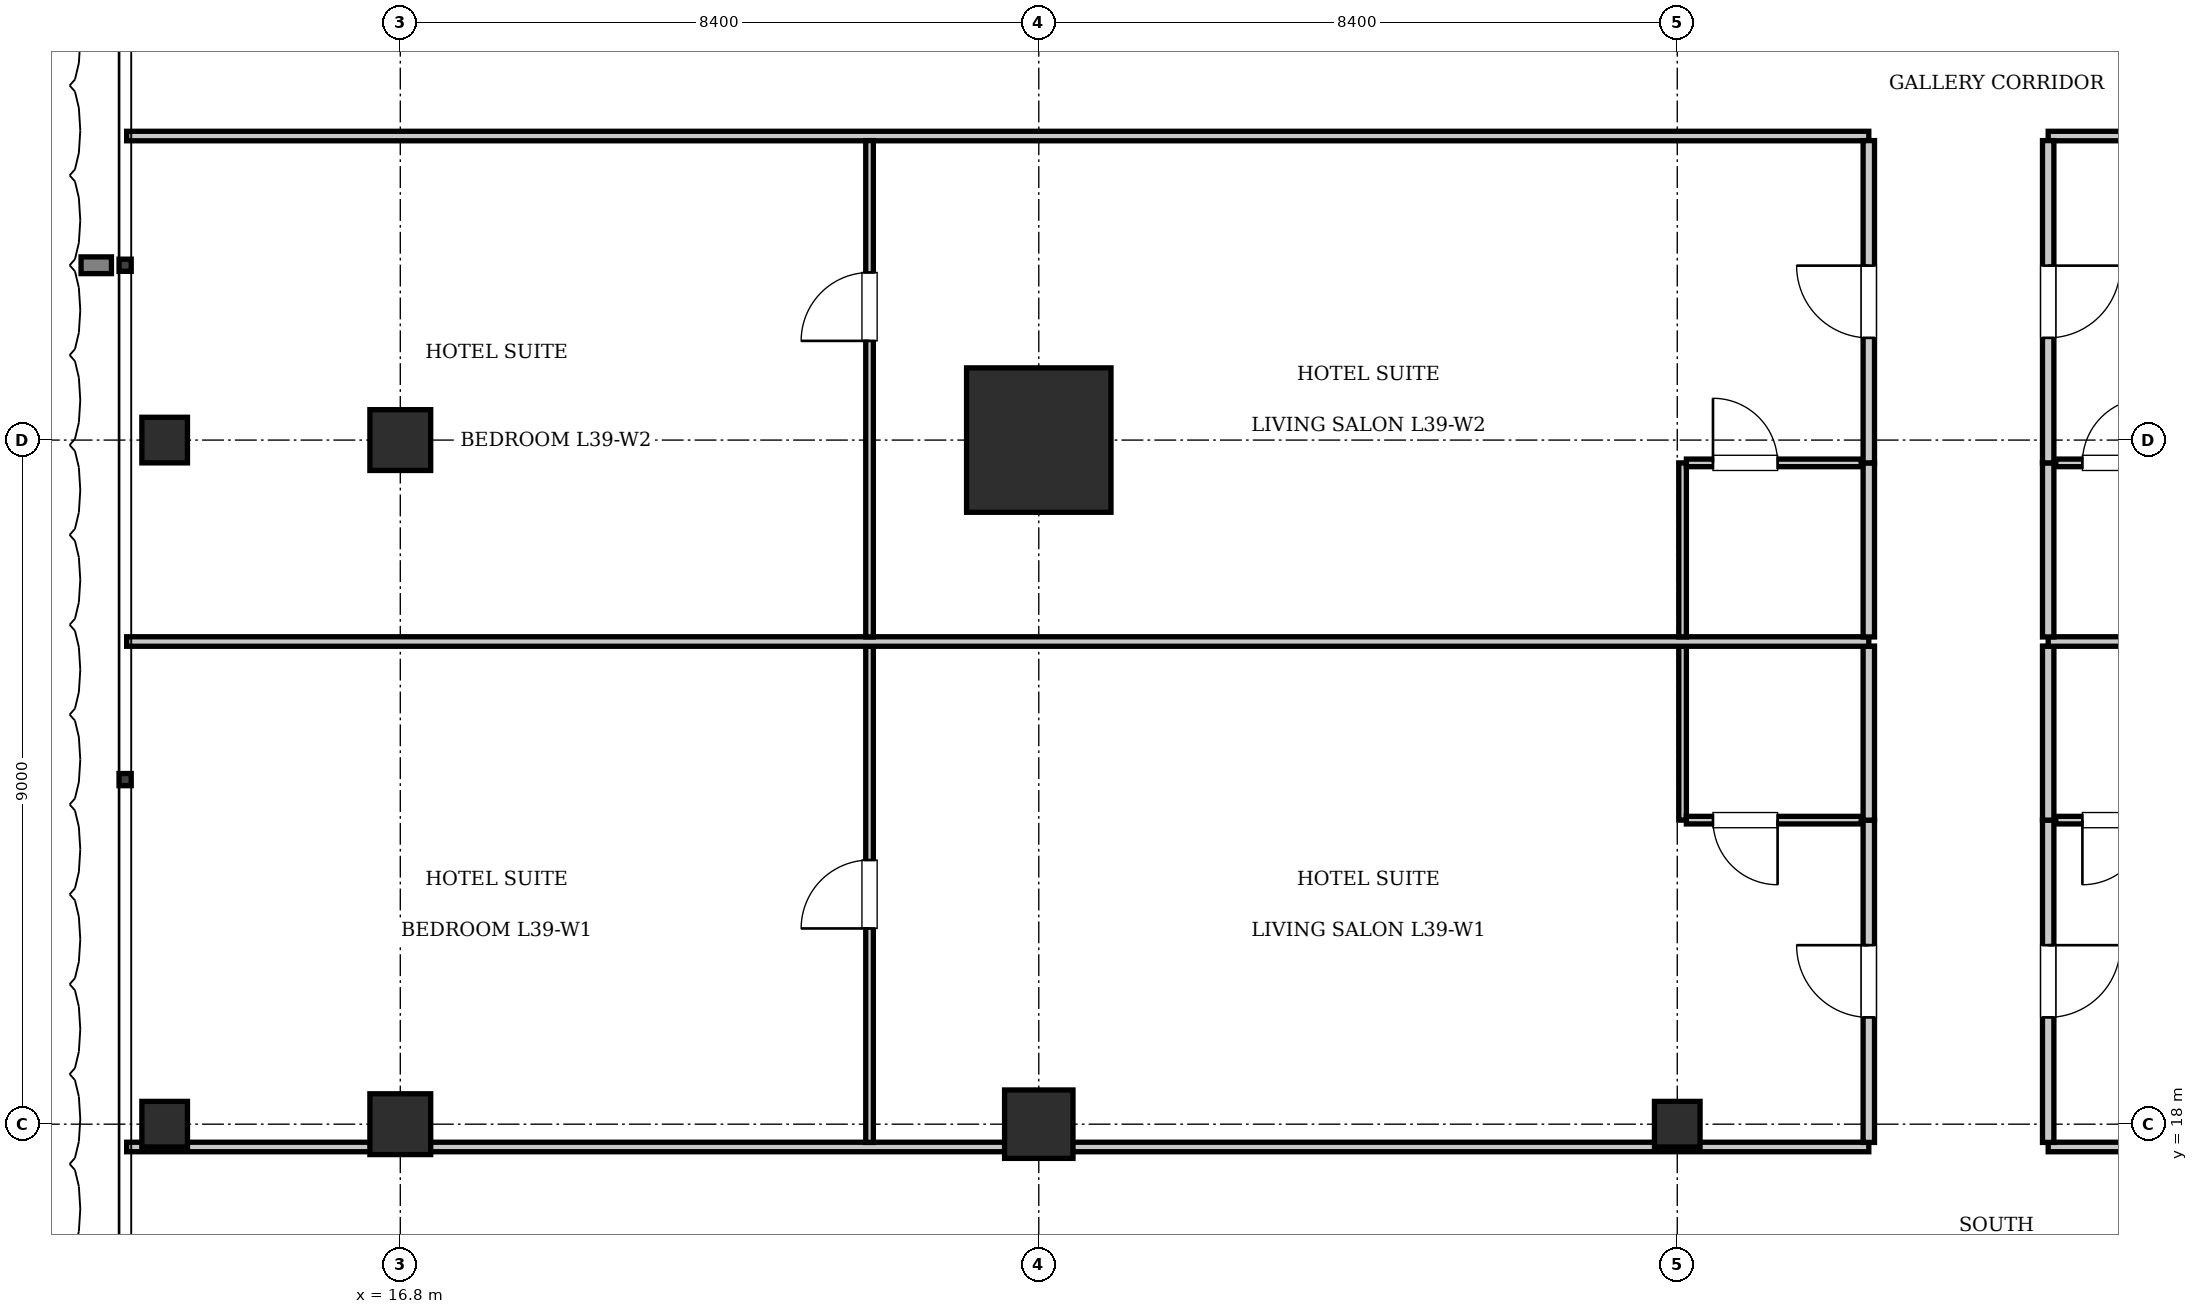
"""IFC4 building model, lengths in metres.
Left out: names, types, materials, properties, quantities, classifications, styles, units other than length and angle.
Written with IfcOpenShell. Run it as: python <this file> out.ifc"""

import sys

from ifc_helpers import new_model, si_unit, direction, frame, frame_2d, origin, origin_2d, place, context, subcontext, project, spatial, rectangle, i_section, extrude, element, fill, save


model = new_model("IFC4")
c1 = context("Model", 3, precision=1e-05, world=origin(), true_north=direction((0.0, 1.0)))
c2 = subcontext(c1, "Body", "Model", "MODEL_VIEW")
j1 = project(units=[si_unit("LENGTHUNIT", "METRE"), si_unit("PLANEANGLEUNIT", "RADIAN")], contexts=[c1])
p1 = place(None, origin())
s1 = spatial("IfcSite", under=j1, at=p1, CompositionType="ELEMENT")
p2 = place(p1, origin())
s2 = spatial("IfcBuilding", under=s1, at=p2, CompositionType="ELEMENT")
p3 = place(p2, frame((0.0, 0.0, 162.05)))
s3 = spatial("IfcBuildingStorey", under=s2, at=p3, CompositionType="ELEMENT", Elevation=162.05)
p4 = place(p3, frame((25.2, 27.0, 0.0), z_axis=(0.0, 0.0, 1.0), x_axis=(1.0, 0.0, 0.0)))
e1 = element("IfcColumn", 1, at=p4, inside=s3, PredefinedType="COLUMN", context=c2, shape_type="SweptSolid", body=[
    extrude(rectangle(XDim=1.9, YDim=1.9, at=origin_2d()), origin(), (0.0, 0.0, 1.0), 3.85),
])
p5 = place(p3, frame((25.2, 18.0, 0.0), z_axis=(0.0, 0.0, 1.0), x_axis=(1.0, 0.0, 0.0)))
e2 = element("IfcColumn", 2, at=p5, inside=s3, PredefinedType="COLUMN", context=c2, shape_type="SweptSolid", body=[
    extrude(rectangle(XDim=0.9, YDim=0.9, at=origin_2d()), origin(), (0.0, 0.0, 1.0), 3.85),
])
p6 = place(p3, frame((33.6, 18.0, 0.0), z_axis=(0.0, 0.0, 1.0), x_axis=(1.0, 0.0, 0.0)))
e3 = element("IfcColumn", 3, at=p6, inside=s3, PredefinedType="COLUMN", context=c2, shape_type="SweptSolid", body=[
    extrude(i_section(OverallWidth=0.6, OverallDepth=0.6, WebThickness=0.025, FlangeThickness=0.038, at=origin_2d()), origin(), (0.0, 0.0, 1.0), 3.85),
])
for number, where, z_axis, x_axis in (
    (4, (16.8, 18.0, 0.0), (0.0, 0.0, 1.0), (1.0, 0.0, 0.0)),
    (5, (16.8, 27.0, 0.0), (0.0, 0.0, 1.0), (1.0, 0.0, 0.0)),
):
    element("IfcColumn", number, at=place(p3, frame(where, z_axis=z_axis, x_axis=x_axis)), inside=s3, PredefinedType="COLUMN", context=c2, shape_type="SweptSolid", body=[
        extrude(rectangle(XDim=0.8, YDim=0.8, at=origin_2d()), origin(), (0.0, 0.0, 1.0), 3.85),
    ])
for number, where, z_axis, x_axis in (
    (6, (13.7, 18.0, 0.0), (0.0, 0.0, 1.0), (1.0, 0.0, 0.0)),
    (7, (13.7, 27.0, 0.0), (0.0, 0.0, 1.0), (1.0, 0.0, 0.0)),
):
    element("IfcColumn", number, at=place(p3, frame(where, z_axis=z_axis, x_axis=x_axis)), inside=s3, PredefinedType="COLUMN", context=c2, shape_type="SweptSolid", body=[
        extrude(i_section(OverallWidth=0.6, OverallDepth=0.6, WebThickness=0.025, FlangeThickness=0.038, at=origin_2d()), origin(), (0.0, 0.0, 1.0), 3.85),
    ])
p7 = place(p3, frame((13.2, 17.7, 0.0), z_axis=(0.0, 0.0, 1.0), x_axis=(1.0, 0.0, 0.0)))
e8 = element("IfcWall", 8, at=p7, inside=s3, PredefinedType="PARTITIONING", context=c2, shape_type="SweptSolid", body=[
    extrude(rectangle(XDim=22.92, YDim=0.125, at=frame_2d((11.46, 0.0))), origin(), (0.0, 0.0, 1.0), 3.61),
])
p8 = place(p3, frame((38.48, 17.7, 0.0), z_axis=(0.0, 0.0, 1.0), x_axis=(1.0, 0.0, 0.0)))
e9 = element("IfcWall", 9, at=p8, inside=s3, PredefinedType="PARTITIONING", context=c2, shape_type="SweptSolid", body=[
    extrude(rectangle(XDim=23.92, YDim=0.125, at=frame_2d((11.96, 0.0))), origin(), (0.0, 0.0, 1.0), 3.61),
])
p9 = place(p3, frame((13.2, 31.0, 0.0), z_axis=(0.0, 0.0, 1.0), x_axis=(1.0, 0.0, 0.0)))
e10 = element("IfcWall", 10, at=p9, inside=s3, PredefinedType="PARTITIONING", context=c2, shape_type="SweptSolid", body=[
    extrude(rectangle(XDim=22.92, YDim=0.125, at=frame_2d((11.46, 0.0))), origin(), (0.0, 0.0, 1.0), 3.61),
])
p10 = place(p3, frame((38.48, 31.0, 0.0), z_axis=(0.0, 0.0, 1.0), x_axis=(1.0, 0.0, 0.0)))
e11 = element("IfcWall", 11, at=p10, inside=s3, PredefinedType="PARTITIONING", context=c2, shape_type="SweptSolid", body=[
    extrude(rectangle(XDim=23.92, YDim=0.125, at=frame_2d((11.96, 0.0))), origin(), (0.0, 0.0, 1.0), 3.61),
])
p11 = place(p3, frame((36.12, 17.76, 0.0), z_axis=(0.0, 0.0, 1.0), x_axis=(0.0, 1.0, 0.0)))
e12 = element("IfcWall", 12, at=p11, inside=s3, PredefinedType="PARTITIONING", context=c2, shape_type="SweptSolid", body=[
    extrude(rectangle(XDim=4.24, YDim=0.15, at=frame_2d((2.12, 0.0))), origin(), (0.0, 0.0, 1.0), 3.61),
])
p12 = place(p11, frame((1.645, 0.0, 0.0)))
e13 = element("IfcOpeningElement", 13, at=p12, cuts=e12, PredefinedType="OPENING", context=c2, shape_type="SweptSolid", body=[
    extrude(rectangle(XDim=0.95, YDim=2.15, at=frame_2d((0.475, 1.075))), frame((0.0, 0.085, 0.0), z_axis=(0.0, -1.0, 0.0), x_axis=(1.0, 0.0, 0.0)), (0.0, 0.0, 1.0), 0.17),
])
p13 = place(p3, frame((36.12, 22.0, 0.0), z_axis=(0.0, 0.0, 1.0), x_axis=(0.0, 1.0, 0.0)))
e14 = element("IfcWall", 14, at=p13, inside=s3, PredefinedType="PARTITIONING", context=c2, shape_type="SweptSolid", body=[
    extrude(rectangle(XDim=2.29, YDim=0.15, at=frame_2d((1.145, 0.0))), origin(), (0.0, 0.0, 1.0), 3.61),
])
p14 = place(p3, frame((33.67, 22.0, 0.0), z_axis=(0.0, 0.0, 1.0), x_axis=(0.0, 1.0, 0.0)))
e15 = element("IfcWall", 15, at=p14, inside=s3, PredefinedType="PARTITIONING", context=c2, shape_type="SweptSolid", body=[
    extrude(rectangle(XDim=2.29, YDim=0.1, at=frame_2d((1.145, 0.0))), origin(), (0.0, 0.0, 1.0), 3.007),
])
p15 = place(p3, frame((33.72, 22.0, 0.0), z_axis=(0.0, 0.0, 1.0), x_axis=(1.0, 0.0, 0.0)))
e16 = element("IfcWall", 16, at=p15, inside=s3, PredefinedType="PARTITIONING", context=c2, shape_type="SweptSolid", body=[
    extrude(rectangle(XDim=2.3, YDim=0.1, at=frame_2d((1.15, 0.0))), origin(), (0.0, 0.0, 1.0), 3.61),
])
p16 = place(p15, frame((0.35, 0.0, 0.0)))
e17 = element("IfcOpeningElement", 17, at=p16, cuts=e16, PredefinedType="OPENING", context=c2, shape_type="SweptSolid", body=[
    extrude(rectangle(XDim=0.85, YDim=2.1, at=frame_2d((0.425, 1.05))), frame((0.0, 0.06, 0.0), z_axis=(0.0, -1.0, 0.0), x_axis=(1.0, 0.0, 0.0)), (0.0, 0.0, 1.0), 0.12),
])
p17 = place(p3, frame((22.974, 17.76, 0.0), z_axis=(0.0, 0.0, 1.0), x_axis=(0.0, 1.0, 0.0)))
e18 = element("IfcWall", 18, at=p17, inside=s3, PredefinedType="PARTITIONING", context=c2, shape_type="SweptSolid", body=[
    extrude(rectangle(XDim=6.53, YDim=0.1, at=frame_2d((3.265, 0.0))), origin(), (0.0, 0.0, 1.0), 3.61),
])
p18 = place(p17, frame((2.815, 0.0, 0.0)))
e19 = element("IfcOpeningElement", 19, at=p18, cuts=e18, PredefinedType="OPENING", context=c2, shape_type="SweptSolid", body=[
    extrude(rectangle(XDim=0.9, YDim=2.1, at=frame_2d((0.45, 1.05))), frame((0.0, 0.06, 0.0), z_axis=(0.0, -1.0, 0.0), x_axis=(1.0, 0.0, 0.0)), (0.0, 0.0, 1.0), 0.12),
])
p19 = place(p3, frame((38.48, 17.76, 0.0), z_axis=(0.0, 0.0, 1.0), x_axis=(0.0, 1.0, 0.0)))
e20 = element("IfcWall", 20, at=p19, inside=s3, PredefinedType="PARTITIONING", context=c2, shape_type="SweptSolid", body=[
    extrude(rectangle(XDim=4.24, YDim=0.15, at=frame_2d((2.12, 0.0))), origin(), (0.0, 0.0, 1.0), 3.61),
])
p20 = place(p19, frame((1.645, 0.0, 0.0)))
e21 = element("IfcOpeningElement", 21, at=p20, cuts=e20, PredefinedType="OPENING", context=c2, shape_type="SweptSolid", body=[
    extrude(rectangle(XDim=0.95, YDim=2.15, at=frame_2d((0.475, 1.075))), frame((0.0, 0.085, 0.0), z_axis=(0.0, -1.0, 0.0), x_axis=(1.0, 0.0, 0.0)), (0.0, 0.0, 1.0), 0.17),
])
p21 = place(p3, frame((38.48, 22.0, 0.0), z_axis=(0.0, 0.0, 1.0), x_axis=(0.0, 1.0, 0.0)))
e22 = element("IfcWall", 22, at=p21, inside=s3, PredefinedType="PARTITIONING", context=c2, shape_type="SweptSolid", body=[
    extrude(rectangle(XDim=2.29, YDim=0.15, at=frame_2d((1.145, 0.0))), origin(), (0.0, 0.0, 1.0), 3.61),
])
p22 = place(p3, frame((38.58, 22.0, 0.0), z_axis=(0.0, 0.0, 1.0), x_axis=(1.0, 0.0, 0.0)))
e23 = element("IfcWall", 23, at=p22, inside=s3, PredefinedType="PARTITIONING", context=c2, shape_type="SweptSolid", body=[
    extrude(rectangle(XDim=2.3, YDim=0.1, at=frame_2d((1.15, 0.0))), origin(), (0.0, 0.0, 1.0), 3.61),
])
p23 = place(p22, frame((0.35, 0.0, 0.0)))
e24 = element("IfcOpeningElement", 24, at=p23, cuts=e23, PredefinedType="OPENING", context=c2, shape_type="SweptSolid", body=[
    extrude(rectangle(XDim=0.85, YDim=2.1, at=frame_2d((0.425, 1.05))), frame((0.0, 0.06, 0.0), z_axis=(0.0, -1.0, 0.0), x_axis=(1.0, 0.0, 0.0)), (0.0, 0.0, 1.0), 0.12),
])
p24 = place(p3, frame((13.2, 24.35, 0.0), z_axis=(0.0, 0.0, 1.0), x_axis=(1.0, 0.0, 0.0)))
e25 = element("IfcWall", 25, at=p24, inside=s3, PredefinedType="PARTITIONING", context=c2, shape_type="SweptSolid", body=[
    extrude(rectangle(XDim=22.92, YDim=0.125, at=frame_2d((11.46, 0.0))), origin(), (0.0, 0.0, 1.0), 3.61),
])
p25 = place(p3, frame((38.48, 24.35, 0.0), z_axis=(0.0, 0.0, 1.0), x_axis=(1.0, 0.0, 0.0)))
e26 = element("IfcWall", 26, at=p25, inside=s3, PredefinedType="PARTITIONING", context=c2, shape_type="SweptSolid", body=[
    extrude(rectangle(XDim=23.92, YDim=0.125, at=frame_2d((11.96, 0.0))), origin(), (0.0, 0.0, 1.0), 3.61),
])
p26 = place(p3, frame((36.12, 24.41, 0.0), z_axis=(0.0, 0.0, 1.0), x_axis=(0.0, 1.0, 0.0)))
e27 = element("IfcWall", 27, at=p26, inside=s3, PredefinedType="PARTITIONING", context=c2, shape_type="SweptSolid", body=[
    extrude(rectangle(XDim=2.29, YDim=0.15, at=frame_2d((1.145, 0.0))), origin(), (0.0, 0.0, 1.0), 3.61),
])
p27 = place(p3, frame((36.12, 26.7, 0.0), z_axis=(0.0, 0.0, 1.0), x_axis=(0.0, 1.0, 0.0)))
e28 = element("IfcWall", 28, at=p27, inside=s3, PredefinedType="PARTITIONING", context=c2, shape_type="SweptSolid", body=[
    extrude(rectangle(XDim=4.24, YDim=0.15, at=frame_2d((2.12, 0.0))), origin(), (0.0, 0.0, 1.0), 3.61),
])
p28 = place(p27, frame((1.645, 0.0, 0.0)))
e29 = element("IfcOpeningElement", 29, at=p28, cuts=e28, PredefinedType="OPENING", context=c2, shape_type="SweptSolid", body=[
    extrude(rectangle(XDim=0.95, YDim=2.15, at=frame_2d((0.475, 1.075))), frame((0.0, 0.085, 0.0), z_axis=(0.0, -1.0, 0.0), x_axis=(1.0, 0.0, 0.0)), (0.0, 0.0, 1.0), 0.17),
])
p29 = place(p3, frame((33.67, 24.41, 0.0), z_axis=(0.0, 0.0, 1.0), x_axis=(0.0, 1.0, 0.0)))
e30 = element("IfcWall", 30, at=p29, inside=s3, PredefinedType="PARTITIONING", context=c2, shape_type="SweptSolid", body=[
    extrude(rectangle(XDim=2.29, YDim=0.1, at=frame_2d((1.145, 0.0))), origin(), (0.0, 0.0, 1.0), 3.007),
])
p30 = place(p3, frame((33.72, 26.7, 0.0), z_axis=(0.0, 0.0, 1.0), x_axis=(1.0, 0.0, 0.0)))
e31 = element("IfcWall", 31, at=p30, inside=s3, PredefinedType="PARTITIONING", context=c2, shape_type="SweptSolid", body=[
    extrude(rectangle(XDim=2.3, YDim=0.1, at=frame_2d((1.15, 0.0))), origin(), (0.0, 0.0, 1.0), 3.61),
])
p31 = place(p30, frame((0.35, 0.0, 0.0)))
e32 = element("IfcOpeningElement", 32, at=p31, cuts=e31, PredefinedType="OPENING", context=c2, shape_type="SweptSolid", body=[
    extrude(rectangle(XDim=0.85, YDim=2.1, at=frame_2d((0.425, 1.05))), frame((0.0, 0.06, 0.0), z_axis=(0.0, -1.0, 0.0), x_axis=(1.0, 0.0, 0.0)), (0.0, 0.0, 1.0), 0.12),
])
p32 = place(p3, frame((22.974, 24.41, 0.0), z_axis=(0.0, 0.0, 1.0), x_axis=(0.0, 1.0, 0.0)))
e33 = element("IfcWall", 33, at=p32, inside=s3, PredefinedType="PARTITIONING", context=c2, shape_type="SweptSolid", body=[
    extrude(rectangle(XDim=6.53, YDim=0.1, at=frame_2d((3.265, 0.0))), origin(), (0.0, 0.0, 1.0), 3.61),
])
p33 = place(p32, frame((3.895, 0.0, 0.0)))
e34 = element("IfcOpeningElement", 34, at=p33, cuts=e33, PredefinedType="OPENING", context=c2, shape_type="SweptSolid", body=[
    extrude(rectangle(XDim=0.9, YDim=2.1, at=frame_2d((0.45, 1.05))), frame((0.0, 0.06, 0.0), z_axis=(0.0, -1.0, 0.0), x_axis=(1.0, 0.0, 0.0)), (0.0, 0.0, 1.0), 0.12),
])
p34 = place(p3, frame((38.48, 24.41, 0.0), z_axis=(0.0, 0.0, 1.0), x_axis=(0.0, 1.0, 0.0)))
e35 = element("IfcWall", 35, at=p34, inside=s3, PredefinedType="PARTITIONING", context=c2, shape_type="SweptSolid", body=[
    extrude(rectangle(XDim=2.29, YDim=0.15, at=frame_2d((1.145, 0.0))), origin(), (0.0, 0.0, 1.0), 3.61),
])
p35 = place(p3, frame((38.48, 26.7, 0.0), z_axis=(0.0, 0.0, 1.0), x_axis=(0.0, 1.0, 0.0)))
e36 = element("IfcWall", 36, at=p35, inside=s3, PredefinedType="PARTITIONING", context=c2, shape_type="SweptSolid", body=[
    extrude(rectangle(XDim=4.24, YDim=0.15, at=frame_2d((2.12, 0.0))), origin(), (0.0, 0.0, 1.0), 3.61),
])
p36 = place(p35, frame((1.645, 0.0, 0.0)))
e37 = element("IfcOpeningElement", 37, at=p36, cuts=e36, PredefinedType="OPENING", context=c2, shape_type="SweptSolid", body=[
    extrude(rectangle(XDim=0.95, YDim=2.15, at=frame_2d((0.475, 1.075))), frame((0.0, 0.085, 0.0), z_axis=(0.0, -1.0, 0.0), x_axis=(1.0, 0.0, 0.0)), (0.0, 0.0, 1.0), 0.17),
])
p37 = place(p3, frame((38.58, 26.7, 0.0), z_axis=(0.0, 0.0, 1.0), x_axis=(1.0, 0.0, 0.0)))
e38 = element("IfcWall", 38, at=p37, inside=s3, PredefinedType="PARTITIONING", context=c2, shape_type="SweptSolid", body=[
    extrude(rectangle(XDim=2.3, YDim=0.1, at=frame_2d((1.15, 0.0))), origin(), (0.0, 0.0, 1.0), 3.61),
])
p38 = place(p37, frame((0.35, 0.0, 0.0)))
e39 = element("IfcOpeningElement", 39, at=p38, cuts=e38, PredefinedType="OPENING", context=c2, shape_type="SweptSolid", body=[
    extrude(rectangle(XDim=0.85, YDim=2.1, at=frame_2d((0.425, 1.05))), frame((0.0, 0.06, 0.0), z_axis=(0.0, -1.0, 0.0), x_axis=(1.0, 0.0, 0.0)), (0.0, 0.0, 1.0), 0.12),
])
p39 = place(p16, frame((0.85, 0.0, 0.0), z_axis=(0.0, 0.0, 1.0), x_axis=(-1.0, 0.0, 0.0)))
e40 = element("IfcDoor", 40, at=p39, inside=s3, OperationType="SINGLE_SWING_LEFT", PredefinedType="DOOR", context=c2, shape_type="SweptSolid", body=[
    extrude(rectangle(XDim=0.85, YDim=2.1, at=frame_2d((0.425, 1.05))), frame((0.0, 0.025, 0.0), z_axis=(0.0, -1.0, 0.0), x_axis=(1.0, 0.0, 0.0)), (0.0, 0.0, 1.0), 0.05),
])
fill(e17, e40)
p40 = place(p12, origin())
e41 = element("IfcDoor", 41, at=p40, inside=s3, OperationType="SINGLE_SWING_RIGHT", PredefinedType="DOOR", context=c2, shape_type="SweptSolid", body=[
    extrude(rectangle(XDim=0.95, YDim=2.15, at=frame_2d((0.475, 1.075))), frame((0.0, 0.025, 0.0), z_axis=(0.0, -1.0, 0.0), x_axis=(1.0, 0.0, 0.0)), (0.0, 0.0, 1.0), 0.05),
])
fill(e13, e41)
p41 = place(p18, origin())
e42 = element("IfcDoor", 42, at=p41, inside=s3, OperationType="SINGLE_SWING_LEFT", PredefinedType="DOOR", context=c2, shape_type="SweptSolid", body=[
    extrude(rectangle(XDim=0.9, YDim=2.1, at=frame_2d((0.45, 1.05))), frame((0.0, 0.025, 0.0), z_axis=(0.0, -1.0, 0.0), x_axis=(1.0, 0.0, 0.0)), (0.0, 0.0, 1.0), 0.05),
])
fill(e19, e42)
p42 = place(p23, frame((0.85, 0.0, 0.0), z_axis=(0.0, 0.0, 1.0), x_axis=(-1.0, 0.0, 0.0)))
e43 = element("IfcDoor", 43, at=p42, inside=s3, OperationType="SINGLE_SWING_RIGHT", PredefinedType="DOOR", context=c2, shape_type="SweptSolid", body=[
    extrude(rectangle(XDim=0.85, YDim=2.1, at=frame_2d((0.425, 1.05))), frame((0.0, 0.025, 0.0), z_axis=(0.0, -1.0, 0.0), x_axis=(1.0, 0.0, 0.0)), (0.0, 0.0, 1.0), 0.05),
])
fill(e24, e43)
p43 = place(p20, frame((0.95, 0.0, 0.0), z_axis=(0.0, 0.0, 1.0), x_axis=(-1.0, 0.0, 0.0)))
e44 = element("IfcDoor", 44, at=p43, inside=s3, OperationType="SINGLE_SWING_LEFT", PredefinedType="DOOR", context=c2, shape_type="SweptSolid", body=[
    extrude(rectangle(XDim=0.95, YDim=2.15, at=frame_2d((0.475, 1.075))), frame((0.0, 0.025, 0.0), z_axis=(0.0, -1.0, 0.0), x_axis=(1.0, 0.0, 0.0)), (0.0, 0.0, 1.0), 0.05),
])
fill(e21, e44)
p44 = place(p31, origin())
e45 = element("IfcDoor", 45, at=p44, inside=s3, OperationType="SINGLE_SWING_LEFT", PredefinedType="DOOR", context=c2, shape_type="SweptSolid", body=[
    extrude(rectangle(XDim=0.85, YDim=2.1, at=frame_2d((0.425, 1.05))), frame((0.0, 0.025, 0.0), z_axis=(0.0, -1.0, 0.0), x_axis=(1.0, 0.0, 0.0)), (0.0, 0.0, 1.0), 0.05),
])
fill(e32, e45)
p45 = place(p28, origin())
e46 = element("IfcDoor", 46, at=p45, inside=s3, OperationType="SINGLE_SWING_RIGHT", PredefinedType="DOOR", context=c2, shape_type="SweptSolid", body=[
    extrude(rectangle(XDim=0.95, YDim=2.15, at=frame_2d((0.475, 1.075))), frame((0.0, 0.025, 0.0), z_axis=(0.0, -1.0, 0.0), x_axis=(1.0, 0.0, 0.0)), (0.0, 0.0, 1.0), 0.05),
])
fill(e29, e46)
p46 = place(p33, origin())
e47 = element("IfcDoor", 47, at=p46, inside=s3, OperationType="SINGLE_SWING_LEFT", PredefinedType="DOOR", context=c2, shape_type="SweptSolid", body=[
    extrude(rectangle(XDim=0.9, YDim=2.1, at=frame_2d((0.45, 1.05))), frame((0.0, 0.025, 0.0), z_axis=(0.0, -1.0, 0.0), x_axis=(1.0, 0.0, 0.0)), (0.0, 0.0, 1.0), 0.05),
])
fill(e34, e47)
p47 = place(p38, origin())
e48 = element("IfcDoor", 48, at=p47, inside=s3, OperationType="SINGLE_SWING_RIGHT", PredefinedType="DOOR", context=c2, shape_type="SweptSolid", body=[
    extrude(rectangle(XDim=0.85, YDim=2.1, at=frame_2d((0.425, 1.05))), frame((0.0, 0.025, 0.0), z_axis=(0.0, -1.0, 0.0), x_axis=(1.0, 0.0, 0.0)), (0.0, 0.0, 1.0), 0.05),
])
fill(e39, e48)
p48 = place(p36, frame((0.95, 0.0, 0.0), z_axis=(0.0, 0.0, 1.0), x_axis=(-1.0, 0.0, 0.0)))
e49 = element("IfcDoor", 49, at=p48, inside=s3, OperationType="SINGLE_SWING_LEFT", PredefinedType="DOOR", context=c2, shape_type="SweptSolid", body=[
    extrude(rectangle(XDim=0.95, YDim=2.15, at=frame_2d((0.475, 1.075))), frame((0.0, 0.025, 0.0), z_axis=(0.0, -1.0, 0.0), x_axis=(1.0, 0.0, 0.0)), (0.0, 0.0, 1.0), 0.05),
])
fill(e37, e49)
save(model, sys.argv[1])
